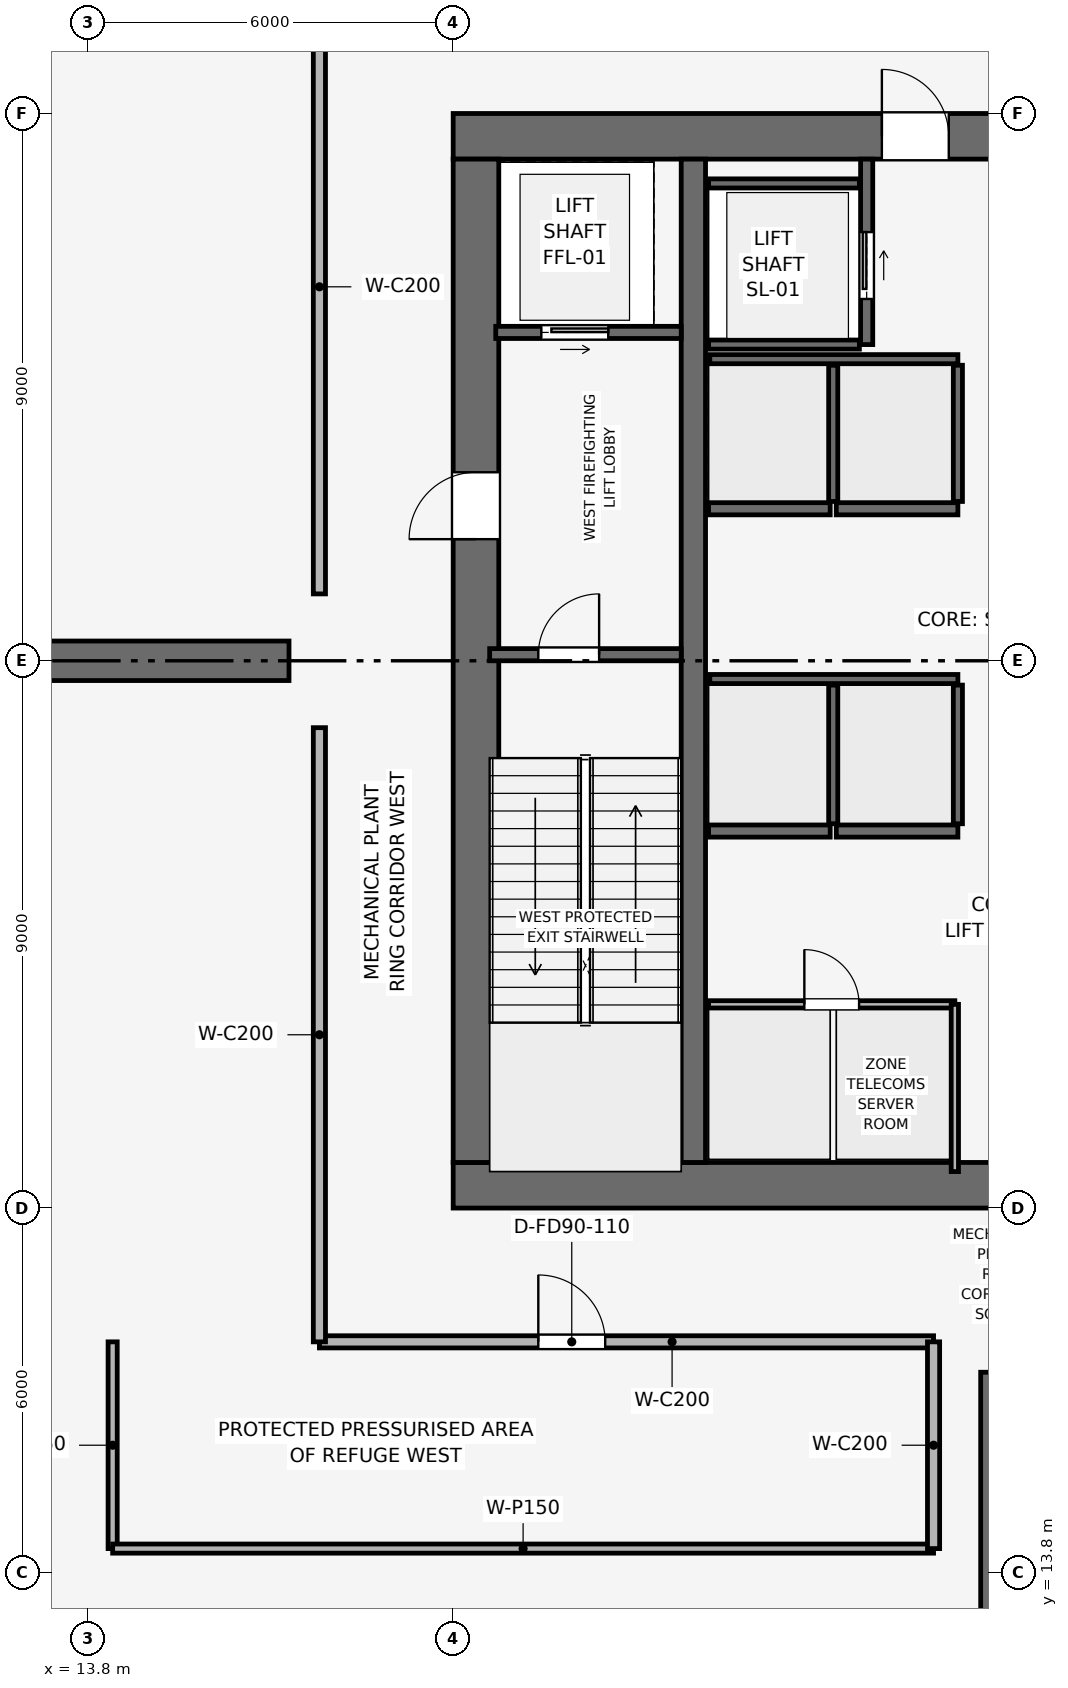
"""IFC4 building model, lengths in metres.
Left out: names, types, materials, properties, quantities, classifications, styles, units other than length and angle.
Written with IfcOpenShell. Run it as: python <this file> out.ifc"""

import sys

from ifc_helpers import new_model, si_unit, direction, frame, frame_2d, origin, place, context, subcontext, project, spatial, rectangle, extrude, element, fill, save


model = new_model("IFC4")
c1 = context("Model", 3, precision=1e-05, world=origin(), true_north=direction((0.0, 1.0)))
c2 = subcontext(c1, "Body", "Model", "MODEL_VIEW")
j1 = project(units=[si_unit("LENGTHUNIT", "METRE"), si_unit("PLANEANGLEUNIT", "RADIAN")], contexts=[c1])
p1 = place(None, origin())
s1 = spatial("IfcSite", under=j1, at=p1, CompositionType="ELEMENT")
p2 = place(p1, origin())
s2 = spatial("IfcBuilding", under=s1, at=p2, CompositionType="ELEMENT")
p3 = place(p2, frame((0.0, 0.0, 194.55)))
s3 = spatial("IfcBuildingStorey", under=s2, at=p3, CompositionType="ELEMENT", Elevation=194.55)
p4 = place(p3, frame((19.8, 20.175, 0.0), z_axis=(0.0, 0.0, 1.0), x_axis=(1.0, 0.0, 0.0)))
e1 = element("IfcWall", 1, at=p4, inside=s3, PredefinedType="SHEAR", context=c2, shape_type="SweptSolid", body=[
    extrude(rectangle(XDim=18.0, YDim=0.75, at=frame_2d((9.0, 0.0))), origin(), (0.0, 0.0, 1.0), 5.4),
])
p5 = place(p3, frame((19.8, 37.425, 0.0), z_axis=(0.0, 0.0, 1.0), x_axis=(1.0, 0.0, 0.0)))
e2 = element("IfcWall", 2, at=p5, inside=s3, PredefinedType="SHEAR", context=c2, shape_type="SweptSolid", body=[
    extrude(rectangle(XDim=18.0, YDim=0.75, at=frame_2d((9.0, 0.0))), origin(), (0.0, 0.0, 1.0), 5.4),
])
p6 = place(p5, frame((7.05, 0.0, 0.0)))
e3 = element("IfcOpeningElement", 3, at=p6, cuts=e2, PredefinedType="OPENING", context=c2, shape_type="SweptSolid", body=[
    extrude(rectangle(XDim=1.1, YDim=2.15, at=frame_2d((0.55, 1.075))), frame((0.0, 0.385, 0.0), z_axis=(0.0, -1.0, 0.0), x_axis=(1.0, 0.0, 0.0)), (0.0, 0.0, 1.0), 0.77),
])
p7 = place(p3, frame((20.175, 20.55, 0.0), z_axis=(0.0, 0.0, 1.0), x_axis=(0.0, 1.0, 0.0)))
e4 = element("IfcWall", 4, at=p7, inside=s3, PredefinedType="SHEAR", context=c2, shape_type="SweptSolid", body=[
    extrude(rectangle(XDim=16.5, YDim=0.75, at=frame_2d((8.25, 0.0))), origin(), (0.0, 0.0, 1.0), 5.4),
])
p8 = place(p7, frame((10.25, 0.0, 0.0)))
e5 = element("IfcOpeningElement", 5, at=p8, cuts=e4, PredefinedType="OPENING", context=c2, shape_type="SweptSolid", body=[
    extrude(rectangle(XDim=1.1, YDim=2.15, at=frame_2d((0.55, 1.075))), frame((0.0, 0.385, 0.0), z_axis=(0.0, -1.0, 0.0), x_axis=(1.0, 0.0, 0.0)), (0.0, 0.0, 1.0), 0.77),
])
p9 = place(p3, frame((23.75, 20.55, 0.0), z_axis=(0.0, 0.0, 1.0), x_axis=(0.0, 1.0, 0.0)))
e6 = element("IfcWall", 6, at=p9, inside=s3, PredefinedType="SHEAR", context=c2, shape_type="SweptSolid", body=[
    extrude(rectangle(XDim=16.5, YDim=0.4, at=frame_2d((8.25, 0.0))), origin(), (0.0, 0.0, 1.0), 5.4),
])
for number, where, z_axis, x_axis in (
    (7, (28.8, 17.1, 0.0), (0.0, 0.0, 1.0), (0.0, -1.0, 0.0)),
    (8, (17.1, 28.8, 0.0), (0.0, 0.0, 1.0), (-1.0, 0.0, 0.0)),
):
    element("IfcWall", number, at=place(p3, frame(where, z_axis=z_axis, x_axis=x_axis)), inside=s3, PredefinedType="SHEAR", context=c2, shape_type="SweptSolid", body=[
        extrude(rectangle(XDim=12.35, YDim=0.65, at=frame_2d((6.175, 0.0))), origin(), (0.0, 0.0, 1.0), 5.15),
    ])
p10 = place(p3, frame((20.4, 28.9, 0.0), z_axis=(0.0, 0.0, 1.0), x_axis=(1.0, 0.0, 0.0)))
e9 = element("IfcWall", 9, at=p10, inside=s3, PredefinedType="SHEAR", context=c2, shape_type="SweptSolid", body=[
    extrude(rectangle(XDim=3.15, YDim=0.2, at=frame_2d((1.575, 0.0))), origin(), (0.0, 0.0, 1.0), 5.15),
])
p11 = place(p10, frame((0.8, 0.0, 0.0)))
e10 = element("IfcOpeningElement", 10, at=p11, cuts=e9, PredefinedType="OPENING", context=c2, shape_type="SweptSolid", body=[
    extrude(rectangle(XDim=1.0, YDim=2.1, at=frame_2d((0.5, 1.05))), frame((0.0, 0.11, 0.0), z_axis=(0.0, -1.0, 0.0), x_axis=(1.0, 0.0, 0.0)), (0.0, 0.0, 1.0), 0.22),
])
p12 = place(p3, frame((20.5, 34.2, 0.0), z_axis=(0.0, 0.0, 1.0), x_axis=(1.0, 0.0, 0.0)))
e11 = element("IfcWall", 11, at=p12, inside=s3, PredefinedType="SHEAR", context=c2, shape_type="SweptSolid", body=[
    extrude(rectangle(XDim=3.05, YDim=0.2, at=frame_2d((1.525, 0.0))), origin(), (0.0, 0.0, 1.0), 5.15),
])
p13 = place(p12, frame((0.75, 0.0, 0.0)))
e12 = element("IfcOpeningElement", 12, at=p13, cuts=e11, PredefinedType="OPENING", context=c2, shape_type="SweptSolid", body=[
    extrude(rectangle(XDim=1.1, YDim=2.15, at=frame_2d((0.55, 1.075))), frame((0.0, 0.11, 0.0), z_axis=(0.0, -1.0, 0.0), x_axis=(1.0, 0.0, 0.0)), (0.0, 0.0, 1.0), 0.22),
])
p14 = place(p3, frame((26.6, 34.0, 0.0), z_axis=(0.0, 0.0, 1.0), x_axis=(0.0, 1.0, 0.0)))
e13 = element("IfcWall", 13, at=p14, inside=s3, PredefinedType="SHEAR", context=c2, shape_type="SweptSolid", body=[
    extrude(rectangle(XDim=3.05, YDim=0.2, at=frame_2d((1.525, 0.0))), origin(), (0.0, 0.0, 1.0), 5.15),
])
p15 = place(p14, frame((0.75, 0.0, 0.0)))
e14 = element("IfcOpeningElement", 14, at=p15, cuts=e13, PredefinedType="OPENING", context=c2, shape_type="SweptSolid", body=[
    extrude(rectangle(XDim=1.1, YDim=2.15, at=frame_2d((0.55, 1.075))), frame((0.0, 0.11, 0.0), z_axis=(0.0, -1.0, 0.0), x_axis=(1.0, 0.0, 0.0)), (0.0, 0.0, 1.0), 0.22),
])
for number, where, z_axis, x_axis in (
    (15, (24.0, 34.0, 0.0), (0.0, 0.0, 1.0), (1.0, 0.0, 0.0)),
    (16, (24.0, 36.65, 0.0), (0.0, 0.0, 1.0), (1.0, 0.0, 0.0)),
):
    element("IfcWall", number, at=place(p3, frame(where, z_axis=z_axis, x_axis=x_axis)), inside=s3, PredefinedType="SHEAR", context=c2, shape_type="SweptSolid", body=[
        extrude(rectangle(XDim=2.48, YDim=0.15, at=frame_2d((1.24, 0.0))), origin(), (0.0, 0.0, 1.0), 5.15),
    ])
for number, where, z_axis, x_axis in (
    (17, (24.0, 26.0, 0.0), (0.0, 0.0, 1.0), (1.0, 0.0, 0.0)),
    (18, (26.1, 26.0, 0.0), (0.0, 0.0, 1.0), (1.0, 0.0, 0.0)),
    (19, (24.0, 31.3, 0.0), (0.0, 0.0, 1.0), (1.0, 0.0, 0.0)),
    (20, (26.1, 31.3, 0.0), (0.0, 0.0, 1.0), (1.0, 0.0, 0.0)),
):
    element("IfcWall", number, at=place(p3, frame(where, z_axis=z_axis, x_axis=x_axis)), inside=s3, PredefinedType="SHEAR", context=c2, shape_type="SweptSolid", body=[
        extrude(rectangle(XDim=2.0, YDim=0.2, at=frame_2d((1.0, 0.0))), origin(), (0.0, 0.0, 1.0), 5.15),
    ])
p16 = place(p3, frame((24.02, 28.5, 0.0), z_axis=(0.0, 0.0, 1.0), x_axis=(1.0, 0.0, 0.0)))
e21 = element("IfcWall", 21, at=p16, inside=s3, PredefinedType="SHEAR", context=c2, shape_type="SweptSolid", body=[
    extrude(rectangle(XDim=4.08, YDim=0.15, at=frame_2d((2.04, 0.0))), origin(), (0.0, 0.0, 1.0), 5.15),
])
for number, where, z_axis, x_axis in (
    (22, (26.05, 26.12, 0.0), (0.0, 0.0, 1.0), (0.0, 1.0, 0.0)),
    (23, (28.1, 26.12, 0.0), (0.0, 0.0, 1.0), (0.0, 1.0, 0.0)),
):
    element("IfcWall", number, at=place(p3, frame(where, z_axis=z_axis, x_axis=x_axis)), inside=s3, PredefinedType="SHEAR", context=c2, shape_type="SweptSolid", body=[
        extrude(rectangle(XDim=2.28, YDim=0.15, at=frame_2d((1.14, 0.0))), origin(), (0.0, 0.0, 1.0), 5.15),
    ])
p17 = place(p3, frame((24.02, 33.76, 0.0), z_axis=(0.0, 0.0, 1.0), x_axis=(1.0, 0.0, 0.0)))
e24 = element("IfcWall", 24, at=p17, inside=s3, PredefinedType="SHEAR", context=c2, shape_type="SweptSolid", body=[
    extrude(rectangle(XDim=4.08, YDim=0.15, at=frame_2d((2.04, 0.0))), origin(), (0.0, 0.0, 1.0), 5.15),
])
for number, where, z_axis, x_axis in (
    (25, (26.05, 31.42, 0.0), (0.0, 0.0, 1.0), (0.0, 1.0, 0.0)),
    (26, (28.1, 31.42, 0.0), (0.0, 0.0, 1.0), (0.0, 1.0, 0.0)),
):
    element("IfcWall", number, at=place(p3, frame(where, z_axis=z_axis, x_axis=x_axis)), inside=s3, PredefinedType="SHEAR", context=c2, shape_type="SweptSolid", body=[
        extrude(rectangle(XDim=2.24, YDim=0.15, at=frame_2d((1.12, 0.0))), origin(), (0.0, 0.0, 1.0), 5.15),
    ])
p18 = place(p3, frame((24.0, 23.15, 0.0), z_axis=(0.0, 0.0, 1.0), x_axis=(1.0, 0.0, 0.0)))
e27 = element("IfcWall", 27, at=p18, inside=s3, PredefinedType="PARTITIONING", context=c2, shape_type="SweptSolid", body=[
    extrude(rectangle(XDim=4.05, YDim=0.12, at=frame_2d((2.025, 0.0))), origin(), (0.0, 0.0, 1.0), 5.15),
])
p19 = place(p18, frame((1.575, 0.0, 0.0)))
e28 = element("IfcOpeningElement", 28, at=p19, cuts=e27, PredefinedType="OPENING", context=c2, shape_type="SweptSolid", body=[
    extrude(rectangle(XDim=0.9, YDim=2.1, at=frame_2d((0.45, 1.05))), frame((0.0, 0.07, 0.0), z_axis=(0.0, -1.0, 0.0), x_axis=(1.0, 0.0, 0.0)), (0.0, 0.0, 1.0), 0.14),
])
p20 = place(p3, frame((28.05, 20.4, 0.0), z_axis=(0.0, 0.0, 1.0), x_axis=(0.0, 1.0, 0.0)))
e29 = element("IfcWall", 29, at=p20, inside=s3, PredefinedType="PARTITIONING", context=c2, shape_type="SweptSolid", body=[
    extrude(rectangle(XDim=2.75, YDim=0.12, at=frame_2d((1.375, 0.0))), origin(), (0.0, 0.0, 1.0), 5.15),
])
p21 = place(p3, frame((17.6, 17.6, 0.0), z_axis=(0.0, 0.0, 1.0), x_axis=(1.0, 0.0, 0.0)))
e30 = element("IfcWall", 30, at=p21, inside=s3, PredefinedType="PARTITIONING", context=c2, shape_type="SweptSolid", body=[
    extrude(rectangle(XDim=10.1, YDim=0.2, at=frame_2d((5.05, 0.0))), origin(), (0.0, 0.0, 1.0), 4.685),
])
p22 = place(p21, frame((3.6, 0.0, 0.0)))
e31 = element("IfcOpeningElement", 31, at=p22, cuts=e30, PredefinedType="OPENING", context=c2, shape_type="SweptSolid", body=[
    extrude(rectangle(XDim=1.1, YDim=2.15, at=frame_2d((0.55, 1.075))), frame((0.0, 0.11, 0.0), z_axis=(0.0, -1.0, 0.0), x_axis=(1.0, 0.0, 0.0)), (0.0, 0.0, 1.0), 0.22),
])
p23 = place(p3, frame((17.6, 17.6, 0.0), z_axis=(0.0, 0.0, 1.0), x_axis=(0.0, 1.0, 0.0)))
e32 = element("IfcWall", 32, at=p23, inside=s3, PredefinedType="PARTITIONING", context=c2, shape_type="SweptSolid", body=[
    extrude(rectangle(XDim=10.1, YDim=0.2, at=frame_2d((5.05, 0.0))), origin(), (0.0, 0.0, 1.0), 4.685),
])
p24 = place(p3, frame((17.6, 29.9, 0.0), z_axis=(0.0, 0.0, 1.0), x_axis=(0.0, 1.0, 0.0)))
e33 = element("IfcWall", 33, at=p24, inside=s3, PredefinedType="PARTITIONING", context=c2, shape_type="SweptSolid", body=[
    extrude(rectangle(XDim=10.1, YDim=0.2, at=frame_2d((5.05, 0.0))), origin(), (0.0, 0.0, 1.0), 4.685),
])
p25 = place(p3, frame((14.2, 14.2, 0.0), z_axis=(0.0, 0.0, 1.0), x_axis=(0.0, 1.0, 0.0)))
e34 = element("IfcWall", 34, at=p25, inside=s3, PredefinedType="PARTITIONING", context=c2, shape_type="SweptSolid", body=[
    extrude(rectangle(XDim=3.4, YDim=0.15, at=frame_2d((1.7, 0.0))), origin(), (0.0, 0.0, 1.0), 4.685),
])
p26 = place(p3, frame((14.2, 14.2, 0.0), z_axis=(0.0, 0.0, 1.0), x_axis=(1.0, 0.0, 0.0)))
e35 = element("IfcWall", 35, at=p26, inside=s3, PredefinedType="PARTITIONING", context=c2, shape_type="SweptSolid", body=[
    extrude(rectangle(XDim=13.5, YDim=0.15, at=frame_2d((6.75, 0.0))), origin(), (0.0, 0.0, 1.0), 4.685),
])
p27 = place(p3, frame((27.7, 14.2, 0.0), z_axis=(0.0, 0.0, 1.0), x_axis=(0.0, 1.0, 0.0)))
e36 = element("IfcWall", 36, at=p27, inside=s3, PredefinedType="PARTITIONING", context=c2, shape_type="SweptSolid", body=[
    extrude(rectangle(XDim=3.4, YDim=0.2, at=frame_2d((1.7, 0.0))), origin(), (0.0, 0.0, 1.0), 5.15),
])
p28 = place(p11, origin())
e37 = element("IfcDoor", 37, at=p28, inside=s3, OperationType="SINGLE_SWING_RIGHT", PredefinedType="DOOR", context=c2, shape_type="SweptSolid", body=[
    extrude(rectangle(XDim=1.0, YDim=2.1, at=frame_2d((0.5, 1.05))), frame((0.0, 0.025, 0.0), z_axis=(0.0, -1.0, 0.0), x_axis=(1.0, 0.0, 0.0)), (0.0, 0.0, 1.0), 0.05),
])
fill(e10, e37)
p29 = place(p13, origin())
e38 = element("IfcDoor", 38, at=p29, inside=s3, OperationType="SLIDING_TO_RIGHT", PredefinedType="DOOR", context=c2, shape_type="SweptSolid", body=[
    extrude(rectangle(XDim=1.1, YDim=2.15, at=frame_2d((0.55, 1.075))), frame((0.0, 0.025, 0.0), z_axis=(0.0, -1.0, 0.0), x_axis=(1.0, 0.0, 0.0)), (0.0, 0.0, 1.0), 0.05),
])
fill(e12, e38)
p30 = place(p15, origin())
e39 = element("IfcDoor", 39, at=p30, inside=s3, OperationType="SLIDING_TO_RIGHT", PredefinedType="DOOR", context=c2, shape_type="SweptSolid", body=[
    extrude(rectangle(XDim=1.1, YDim=2.15, at=frame_2d((0.55, 1.075))), frame((0.0, 0.025, 0.0), z_axis=(0.0, -1.0, 0.0), x_axis=(1.0, 0.0, 0.0)), (0.0, 0.0, 1.0), 0.05),
])
fill(e14, e39)
p31 = place(p19, origin())
e40 = element("IfcDoor", 40, at=p31, inside=s3, OperationType="SINGLE_SWING_LEFT", PredefinedType="DOOR", context=c2, shape_type="SweptSolid", body=[
    extrude(rectangle(XDim=0.9, YDim=2.1, at=frame_2d((0.45, 1.05))), frame((0.0, 0.025, 0.0), z_axis=(0.0, -1.0, 0.0), x_axis=(1.0, 0.0, 0.0)), (0.0, 0.0, 1.0), 0.05),
])
fill(e28, e40)
p32 = place(p22, origin())
e41 = element("IfcDoor", 41, at=p32, inside=s3, OperationType="SINGLE_SWING_LEFT", PredefinedType="DOOR", context=c2, shape_type="SweptSolid", body=[
    extrude(rectangle(XDim=1.1, YDim=2.15, at=frame_2d((0.55, 1.075))), frame((0.0, 0.025, 0.0), z_axis=(0.0, -1.0, 0.0), x_axis=(1.0, 0.0, 0.0)), (0.0, 0.0, 1.0), 0.05),
])
fill(e31, e41)
p33 = place(p8, origin())
e42 = element("IfcDoor", 42, at=p33, inside=s3, OperationType="SINGLE_SWING_LEFT", PredefinedType="DOOR", context=c2, shape_type="SweptSolid", body=[
    extrude(rectangle(XDim=1.1, YDim=2.15, at=frame_2d((0.55, 1.075))), frame((0.0, 0.025, 0.0), z_axis=(0.0, -1.0, 0.0), x_axis=(1.0, 0.0, 0.0)), (0.0, 0.0, 1.0), 0.05),
])
fill(e5, e42)
p34 = place(p6, origin())
e43 = element("IfcDoor", 43, at=p34, inside=s3, OperationType="SINGLE_SWING_LEFT", PredefinedType="DOOR", context=c2, shape_type="SweptSolid", body=[
    extrude(rectangle(XDim=1.1, YDim=2.15, at=frame_2d((0.55, 1.075))), frame((0.0, 0.025, 0.0), z_axis=(0.0, -1.0, 0.0), x_axis=(1.0, 0.0, 0.0)), (0.0, 0.0, 1.0), 0.05),
])
fill(e3, e43)
save(model, sys.argv[1])
